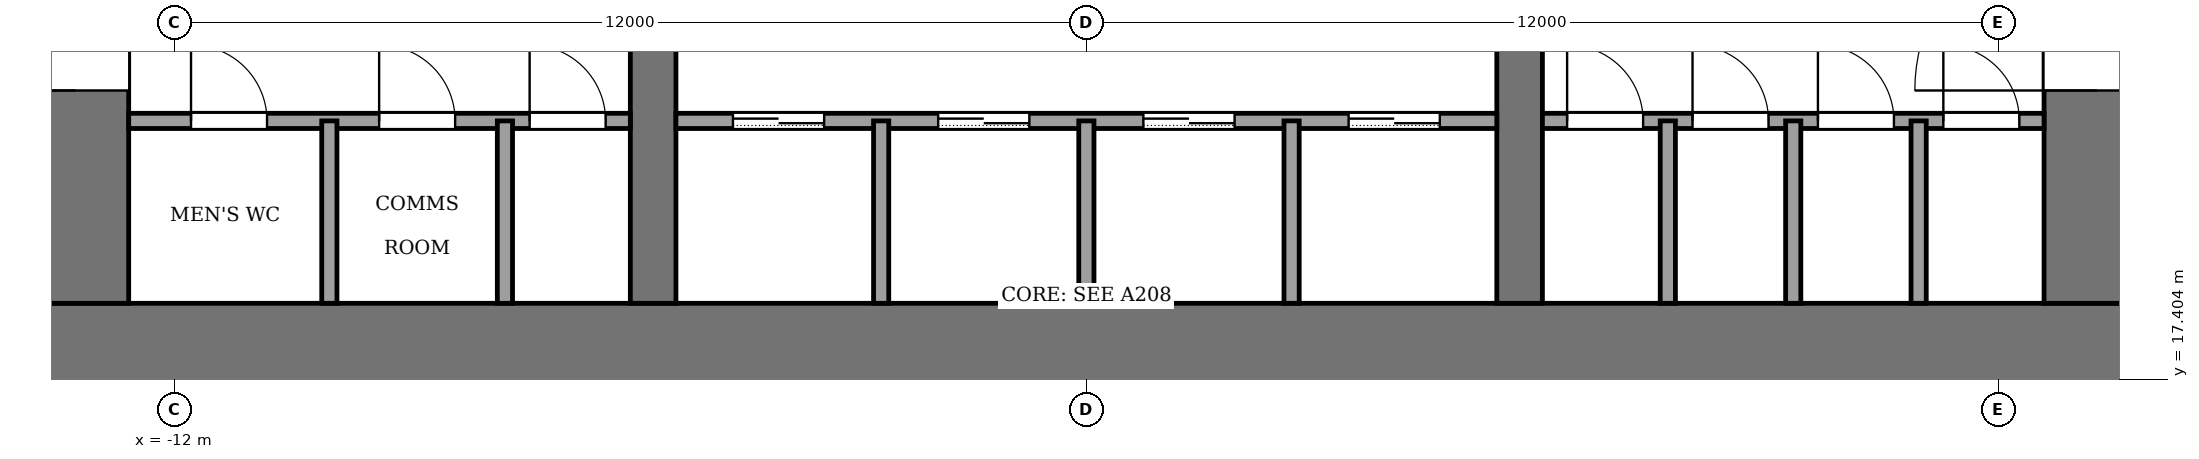
"""IFC4 building model, lengths in metres.
Left out: names, types, materials, properties, quantities, classifications, styles, units other than length and angle.
Written with IfcOpenShell. Run it as: python <this file> out.ifc"""

import sys

from ifc_helpers import new_model, si_unit, direction, frame, frame_2d, origin, place, context, subcontext, project, spatial, rectangle, extrude, element, fill, save


model = new_model("IFC4")
c1 = context("Model", 3, precision=1e-05, world=origin(), true_north=direction((0.0, 1.0)))
c2 = subcontext(c1, "Body", "Model", "MODEL_VIEW")
j1 = project(units=[si_unit("LENGTHUNIT", "METRE"), si_unit("PLANEANGLEUNIT", "RADIAN")], contexts=[c1])
p1 = place(None, origin())
s1 = spatial("IfcSite", under=j1, at=p1, CompositionType="ELEMENT")
p2 = place(p1, origin())
s2 = spatial("IfcBuilding", under=s1, at=p2, CompositionType="ELEMENT")
p3 = place(p2, frame((0.0, 0.0, 46.0)))
s3 = spatial("IfcBuildingStorey", under=s2, at=p3, CompositionType="ELEMENT", Elevation=46.0)
p4 = place(p3, frame((-14.0, 17.7, -0.13), z_axis=(0.0, 0.0, 1.0), x_axis=(1.0, 0.0, 0.0)))
e1 = element("IfcWall", 1, at=p4, inside=s3, PredefinedType="SHEAR", context=c2, shape_type="SweptSolid", body=[
    extrude(rectangle(XDim=28.0, YDim=1.4, at=frame_2d((14.0, 0.0))), origin(), (0.0, 0.0, 1.0), 4.0),
])
p5 = place(p3, frame((-13.3, 18.4, -0.13), z_axis=(0.0, 0.0, 1.0), x_axis=(0.0, 1.0, 0.0)))
e2 = element("IfcWall", 2, at=p5, inside=s3, PredefinedType="SHEAR", context=c2, shape_type="SweptSolid", body=[
    extrude(rectangle(XDim=19.2, YDim=1.4, at=frame_2d((9.6, 0.0))), origin(), (0.0, 0.0, 1.0), 4.0),
])
p6 = place(p5, frame((2.8, 0.0, 0.13)))
e3 = element("IfcOpeningElement", 3, at=p6, cuts=e2, PredefinedType="OPENING", context=c2, shape_type="SweptSolid", body=[
    extrude(rectangle(XDim=2.4, YDim=2.4, at=frame_2d((1.2, 1.2))), frame((0.0, 0.71, 0.0), z_axis=(0.0, -1.0, 0.0), x_axis=(1.0, 0.0, 0.0)), (0.0, 0.0, 1.0), 1.42),
])
p7 = place(p5, frame((13.4, 0.0, 0.13)))
e4 = element("IfcOpeningElement", 4, at=p7, cuts=e2, PredefinedType="OPENING", context=c2, shape_type="SweptSolid", body=[
    extrude(rectangle(XDim=1.4, YDim=2.2, at=frame_2d((0.7, 1.1))), frame((0.0, 0.71, 0.0), z_axis=(0.0, -1.0, 0.0), x_axis=(1.0, 0.0, 0.0)), (0.0, 0.0, 1.0), 1.42),
])
p8 = place(p3, frame((13.3, 18.4, -0.13), z_axis=(0.0, 0.0, 1.0), x_axis=(0.0, 1.0, 0.0)))
e5 = element("IfcWall", 5, at=p8, inside=s3, PredefinedType="SHEAR", context=c2, shape_type="SweptSolid", body=[
    extrude(rectangle(XDim=19.2, YDim=1.4, at=frame_2d((9.6, 0.0))), origin(), (0.0, 0.0, 1.0), 4.0),
])
p9 = place(p8, frame((2.8, 0.0, 0.13)))
e6 = element("IfcOpeningElement", 6, at=p9, cuts=e5, PredefinedType="OPENING", context=c2, shape_type="SweptSolid", body=[
    extrude(rectangle(XDim=2.4, YDim=2.4, at=frame_2d((1.2, 1.2))), frame((0.0, 0.71, 0.0), z_axis=(0.0, -1.0, 0.0), x_axis=(1.0, 0.0, 0.0)), (0.0, 0.0, 1.0), 1.42),
])
p10 = place(p8, frame((13.3, 0.0, 0.13)))
e7 = element("IfcOpeningElement", 7, at=p10, cuts=e5, PredefinedType="OPENING", context=c2, shape_type="SweptSolid", body=[
    extrude(rectangle(XDim=2.4, YDim=2.4, at=frame_2d((1.2, 1.2))), frame((0.0, 0.71, 0.0), z_axis=(0.0, -1.0, 0.0), x_axis=(1.0, 0.0, 0.0)), (0.0, 0.0, 1.0), 1.42),
])
p11 = place(p3, frame((-5.7, 18.4, -0.13), z_axis=(0.0, 0.0, 1.0), x_axis=(0.0, 1.0, 0.0)))
e8 = element("IfcWall", 8, at=p11, inside=s3, PredefinedType="SHEAR", context=c2, shape_type="SweptSolid", body=[
    extrude(rectangle(XDim=19.2, YDim=0.6, at=frame_2d((9.6, 0.0))), origin(), (0.0, 0.0, 1.0), 4.0),
])
p12 = place(p11, frame((8.35, 0.0, 0.13)))
e9 = element("IfcOpeningElement", 9, at=p12, cuts=e8, PredefinedType="OPENING", context=c2, shape_type="SweptSolid", body=[
    extrude(rectangle(XDim=0.9, YDim=2.1, at=frame_2d((0.45, 1.05))), frame((0.0, 0.31, 0.0), z_axis=(0.0, -1.0, 0.0), x_axis=(1.0, 0.0, 0.0)), (0.0, 0.0, 1.0), 0.62),
])
p13 = place(p3, frame((5.7, 18.4, -0.13), z_axis=(0.0, 0.0, 1.0), x_axis=(0.0, 1.0, 0.0)))
e10 = element("IfcWall", 10, at=p13, inside=s3, PredefinedType="SHEAR", context=c2, shape_type="SweptSolid", body=[
    extrude(rectangle(XDim=19.2, YDim=0.6, at=frame_2d((9.6, 0.0))), origin(), (0.0, 0.0, 1.0), 4.0),
])
p14 = place(p13, frame((13.3, 0.0, 0.13)))
e11 = element("IfcOpeningElement", 11, at=p14, cuts=e10, PredefinedType="OPENING", context=c2, shape_type="SweptSolid", body=[
    extrude(rectangle(XDim=2.4, YDim=2.4, at=frame_2d((1.2, 1.2))), frame((0.0, 0.31, 0.0), z_axis=(0.0, -1.0, 0.0), x_axis=(1.0, 0.0, 0.0)), (0.0, 0.0, 1.0), 0.62),
])
p15 = place(p3, frame((-12.6, 20.8, 0.0), z_axis=(0.0, 0.0, 1.0), x_axis=(1.0, 0.0, 0.0)))
e12 = element("IfcWall", 12, at=p15, inside=s3, PredefinedType="PARTITIONING", context=c2, shape_type="SweptSolid", body=[
    extrude(rectangle(XDim=6.6, YDim=0.2, at=frame_2d((3.3, 0.0))), origin(), (0.0, 0.0, 1.0), 3.87),
])
p16 = place(p15, frame((0.82, 0.0, 0.0)))
e13 = element("IfcOpeningElement", 13, at=p16, cuts=e12, PredefinedType="OPENING", context=c2, shape_type="SweptSolid", body=[
    extrude(rectangle(XDim=1.0, YDim=2.1, at=frame_2d((0.5, 1.05))), frame((0.0, 0.11, 0.0), z_axis=(0.0, -1.0, 0.0), x_axis=(1.0, 0.0, 0.0)), (0.0, 0.0, 1.0), 0.22),
])
p17 = place(p15, frame((3.295, 0.0, 0.0)))
e14 = element("IfcOpeningElement", 14, at=p17, cuts=e12, PredefinedType="OPENING", context=c2, shape_type="SweptSolid", body=[
    extrude(rectangle(XDim=1.0, YDim=2.1, at=frame_2d((0.5, 1.05))), frame((0.0, 0.11, 0.0), z_axis=(0.0, -1.0, 0.0), x_axis=(1.0, 0.0, 0.0)), (0.0, 0.0, 1.0), 0.22),
])
p18 = place(p15, frame((5.275, 0.0, 0.0)))
e15 = element("IfcOpeningElement", 15, at=p18, cuts=e12, PredefinedType="OPENING", context=c2, shape_type="SweptSolid", body=[
    extrude(rectangle(XDim=1.0, YDim=2.1, at=frame_2d((0.5, 1.05))), frame((0.0, 0.11, 0.0), z_axis=(0.0, -1.0, 0.0), x_axis=(1.0, 0.0, 0.0)), (0.0, 0.0, 1.0), 0.22),
])
p19 = place(p3, frame((-5.4, 20.8, 0.0), z_axis=(0.0, 0.0, 1.0), x_axis=(1.0, 0.0, 0.0)))
e16 = element("IfcWall", 16, at=p19, inside=s3, PredefinedType="PARTITIONING", context=c2, shape_type="SweptSolid", body=[
    extrude(rectangle(XDim=10.8, YDim=0.2, at=frame_2d((5.4, 0.0))), origin(), (0.0, 0.0, 1.0), 3.87),
])
p20 = place(p19, frame((0.75, 0.0, 0.0)))
e17 = element("IfcOpeningElement", 17, at=p20, cuts=e16, PredefinedType="OPENING", context=c2, shape_type="SweptSolid", body=[
    extrude(rectangle(XDim=1.2, YDim=2.2, at=frame_2d((0.6, 1.1))), frame((0.0, 0.11, 0.0), z_axis=(0.0, -1.0, 0.0), x_axis=(1.0, 0.0, 0.0)), (0.0, 0.0, 1.0), 0.22),
])
p21 = place(p19, frame((3.45, 0.0, 0.0)))
e18 = element("IfcOpeningElement", 18, at=p21, cuts=e16, PredefinedType="OPENING", context=c2, shape_type="SweptSolid", body=[
    extrude(rectangle(XDim=1.2, YDim=2.2, at=frame_2d((0.6, 1.1))), frame((0.0, 0.11, 0.0), z_axis=(0.0, -1.0, 0.0), x_axis=(1.0, 0.0, 0.0)), (0.0, 0.0, 1.0), 0.22),
])
p22 = place(p19, frame((6.15, 0.0, 0.0)))
e19 = element("IfcOpeningElement", 19, at=p22, cuts=e16, PredefinedType="OPENING", context=c2, shape_type="SweptSolid", body=[
    extrude(rectangle(XDim=1.2, YDim=2.2, at=frame_2d((0.6, 1.1))), frame((0.0, 0.11, 0.0), z_axis=(0.0, -1.0, 0.0), x_axis=(1.0, 0.0, 0.0)), (0.0, 0.0, 1.0), 0.22),
])
p23 = place(p19, frame((8.85, 0.0, 0.0)))
e20 = element("IfcOpeningElement", 20, at=p23, cuts=e16, PredefinedType="OPENING", context=c2, shape_type="SweptSolid", body=[
    extrude(rectangle(XDim=1.2, YDim=2.2, at=frame_2d((0.6, 1.1))), frame((0.0, 0.11, 0.0), z_axis=(0.0, -1.0, 0.0), x_axis=(1.0, 0.0, 0.0)), (0.0, 0.0, 1.0), 0.22),
])
p24 = place(p3, frame((6.0, 20.8, 0.0), z_axis=(0.0, 0.0, 1.0), x_axis=(1.0, 0.0, 0.0)))
e21 = element("IfcWall", 21, at=p24, inside=s3, PredefinedType="PARTITIONING", context=c2, shape_type="SweptSolid", body=[
    extrude(rectangle(XDim=6.6, YDim=0.2, at=frame_2d((3.3, 0.0))), origin(), (0.0, 0.0, 1.0), 3.87),
])
p25 = place(p24, frame((0.325, 0.0, 0.0)))
e22 = element("IfcOpeningElement", 22, at=p25, cuts=e21, PredefinedType="OPENING", context=c2, shape_type="SweptSolid", body=[
    extrude(rectangle(XDim=1.0, YDim=2.1, at=frame_2d((0.5, 1.05))), frame((0.0, 0.11, 0.0), z_axis=(0.0, -1.0, 0.0), x_axis=(1.0, 0.0, 0.0)), (0.0, 0.0, 1.0), 0.22),
])
p26 = place(p24, frame((1.975, 0.0, 0.0)))
e23 = element("IfcOpeningElement", 23, at=p26, cuts=e21, PredefinedType="OPENING", context=c2, shape_type="SweptSolid", body=[
    extrude(rectangle(XDim=1.0, YDim=2.1, at=frame_2d((0.5, 1.05))), frame((0.0, 0.11, 0.0), z_axis=(0.0, -1.0, 0.0), x_axis=(1.0, 0.0, 0.0)), (0.0, 0.0, 1.0), 0.22),
])
p27 = place(p24, frame((3.625, 0.0, 0.0)))
e24 = element("IfcOpeningElement", 24, at=p27, cuts=e21, PredefinedType="OPENING", context=c2, shape_type="SweptSolid", body=[
    extrude(rectangle(XDim=1.0, YDim=2.1, at=frame_2d((0.5, 1.05))), frame((0.0, 0.11, 0.0), z_axis=(0.0, -1.0, 0.0), x_axis=(1.0, 0.0, 0.0)), (0.0, 0.0, 1.0), 0.22),
])
p28 = place(p24, frame((5.275, 0.0, 0.0)))
e25 = element("IfcOpeningElement", 25, at=p28, cuts=e21, PredefinedType="OPENING", context=c2, shape_type="SweptSolid", body=[
    extrude(rectangle(XDim=1.0, YDim=2.1, at=frame_2d((0.5, 1.05))), frame((0.0, 0.11, 0.0), z_axis=(0.0, -1.0, 0.0), x_axis=(1.0, 0.0, 0.0)), (0.0, 0.0, 1.0), 0.22),
])
for number, where, z_axis, x_axis in (
    (26, (-9.96, 18.4, 0.0), (0.0, 0.0, 1.0), (0.0, 1.0, 0.0)),
    (27, (-7.65, 18.4, 0.0), (0.0, 0.0, 1.0), (0.0, 1.0, 0.0)),
    (28, (-2.7, 18.4, 0.0), (0.0, 0.0, 1.0), (0.0, 1.0, 0.0)),
    (29, (0.0, 18.4, 0.0), (0.0, 0.0, 1.0), (0.0, 1.0, 0.0)),
    (30, (2.7, 18.4, 0.0), (0.0, 0.0, 1.0), (0.0, 1.0, 0.0)),
    (31, (7.65, 18.4, 0.0), (0.0, 0.0, 1.0), (0.0, 1.0, 0.0)),
    (32, (9.3, 18.4, 0.0), (0.0, 0.0, 1.0), (0.0, 1.0, 0.0)),
    (33, (10.95, 18.4, 0.0), (0.0, 0.0, 1.0), (0.0, 1.0, 0.0)),
):
    element("IfcWall", number, at=place(p3, frame(where, z_axis=z_axis, x_axis=x_axis)), inside=s3, PredefinedType="PARTITIONING", context=c2, shape_type="SweptSolid", body=[
        extrude(rectangle(XDim=2.4, YDim=0.2, at=frame_2d((1.2, 0.0))), origin(), (0.0, 0.0, 1.0), 3.87),
    ])
p29 = place(p20, origin())
e34 = element("IfcDoor", 34, at=p29, inside=s3, OperationType="SLIDING_TO_LEFT", PredefinedType="DOOR", context=c2, shape_type="SweptSolid", body=[
    extrude(rectangle(XDim=1.2, YDim=2.2, at=frame_2d((0.6, 1.1))), frame((0.0, 0.025, 0.0), z_axis=(0.0, -1.0, 0.0), x_axis=(1.0, 0.0, 0.0)), (0.0, 0.0, 1.0), 0.05),
])
fill(e17, e34)
p30 = place(p21, origin())
e35 = element("IfcDoor", 35, at=p30, inside=s3, OperationType="SLIDING_TO_LEFT", PredefinedType="DOOR", context=c2, shape_type="SweptSolid", body=[
    extrude(rectangle(XDim=1.2, YDim=2.2, at=frame_2d((0.6, 1.1))), frame((0.0, 0.025, 0.0), z_axis=(0.0, -1.0, 0.0), x_axis=(1.0, 0.0, 0.0)), (0.0, 0.0, 1.0), 0.05),
])
fill(e18, e35)
p31 = place(p22, origin())
e36 = element("IfcDoor", 36, at=p31, inside=s3, OperationType="SLIDING_TO_LEFT", PredefinedType="DOOR", context=c2, shape_type="SweptSolid", body=[
    extrude(rectangle(XDim=1.2, YDim=2.2, at=frame_2d((0.6, 1.1))), frame((0.0, 0.025, 0.0), z_axis=(0.0, -1.0, 0.0), x_axis=(1.0, 0.0, 0.0)), (0.0, 0.0, 1.0), 0.05),
])
fill(e19, e36)
p32 = place(p23, origin())
e37 = element("IfcDoor", 37, at=p32, inside=s3, OperationType="SLIDING_TO_LEFT", PredefinedType="DOOR", context=c2, shape_type="SweptSolid", body=[
    extrude(rectangle(XDim=1.2, YDim=2.2, at=frame_2d((0.6, 1.1))), frame((0.0, 0.025, 0.0), z_axis=(0.0, -1.0, 0.0), x_axis=(1.0, 0.0, 0.0)), (0.0, 0.0, 1.0), 0.05),
])
fill(e20, e37)
p33 = place(p16, origin())
e38 = element("IfcDoor", 38, at=p33, inside=s3, OperationType="SINGLE_SWING_LEFT", PredefinedType="DOOR", context=c2, shape_type="SweptSolid", body=[
    extrude(rectangle(XDim=1.0, YDim=2.1, at=frame_2d((0.5, 1.05))), frame((0.0, 0.025, 0.0), z_axis=(0.0, -1.0, 0.0), x_axis=(1.0, 0.0, 0.0)), (0.0, 0.0, 1.0), 0.05),
])
fill(e13, e38)
p34 = place(p17, origin())
e39 = element("IfcDoor", 39, at=p34, inside=s3, OperationType="SINGLE_SWING_LEFT", PredefinedType="DOOR", context=c2, shape_type="SweptSolid", body=[
    extrude(rectangle(XDim=1.0, YDim=2.1, at=frame_2d((0.5, 1.05))), frame((0.0, 0.025, 0.0), z_axis=(0.0, -1.0, 0.0), x_axis=(1.0, 0.0, 0.0)), (0.0, 0.0, 1.0), 0.05),
])
fill(e14, e39)
p35 = place(p18, origin())
e40 = element("IfcDoor", 40, at=p35, inside=s3, OperationType="SINGLE_SWING_RIGHT", PredefinedType="DOOR", context=c2, shape_type="SweptSolid", body=[
    extrude(rectangle(XDim=1.0, YDim=2.1, at=frame_2d((0.5, 1.05))), frame((0.0, 0.025, 0.0), z_axis=(0.0, -1.0, 0.0), x_axis=(1.0, 0.0, 0.0)), (0.0, 0.0, 1.0), 0.05),
])
fill(e15, e40)
p36 = place(p25, origin())
e41 = element("IfcDoor", 41, at=p36, inside=s3, OperationType="SINGLE_SWING_LEFT", PredefinedType="DOOR", context=c2, shape_type="SweptSolid", body=[
    extrude(rectangle(XDim=1.0, YDim=2.1, at=frame_2d((0.5, 1.05))), frame((0.0, 0.025, 0.0), z_axis=(0.0, -1.0, 0.0), x_axis=(1.0, 0.0, 0.0)), (0.0, 0.0, 1.0), 0.05),
])
fill(e22, e41)
p37 = place(p26, origin())
e42 = element("IfcDoor", 42, at=p37, inside=s3, OperationType="SINGLE_SWING_LEFT", PredefinedType="DOOR", context=c2, shape_type="SweptSolid", body=[
    extrude(rectangle(XDim=1.0, YDim=2.1, at=frame_2d((0.5, 1.05))), frame((0.0, 0.025, 0.0), z_axis=(0.0, -1.0, 0.0), x_axis=(1.0, 0.0, 0.0)), (0.0, 0.0, 1.0), 0.05),
])
fill(e23, e42)
p38 = place(p27, origin())
e43 = element("IfcDoor", 43, at=p38, inside=s3, OperationType="SINGLE_SWING_RIGHT", PredefinedType="DOOR", context=c2, shape_type="SweptSolid", body=[
    extrude(rectangle(XDim=1.0, YDim=2.1, at=frame_2d((0.5, 1.05))), frame((0.0, 0.025, 0.0), z_axis=(0.0, -1.0, 0.0), x_axis=(1.0, 0.0, 0.0)), (0.0, 0.0, 1.0), 0.05),
])
fill(e24, e43)
p39 = place(p28, origin())
e44 = element("IfcDoor", 44, at=p39, inside=s3, OperationType="SINGLE_SWING_RIGHT", PredefinedType="DOOR", context=c2, shape_type="SweptSolid", body=[
    extrude(rectangle(XDim=1.0, YDim=2.1, at=frame_2d((0.5, 1.05))), frame((0.0, 0.025, 0.0), z_axis=(0.0, -1.0, 0.0), x_axis=(1.0, 0.0, 0.0)), (0.0, 0.0, 1.0), 0.05),
])
fill(e25, e44)
p40 = place(p6, origin())
e45 = element("IfcDoor", 45, at=p40, inside=s3, OperationType="DOUBLE_DOOR_SINGLE_SWING", PredefinedType="DOOR", context=c2, shape_type="SweptSolid", body=[
    extrude(rectangle(XDim=2.4, YDim=2.4, at=frame_2d((1.2, 1.2))), frame((0.0, 0.025, 0.0), z_axis=(0.0, -1.0, 0.0), x_axis=(1.0, 0.0, 0.0)), (0.0, 0.0, 1.0), 0.05),
])
fill(e3, e45)
p41 = place(p9, origin())
e46 = element("IfcDoor", 46, at=p41, inside=s3, OperationType="DOUBLE_DOOR_SINGLE_SWING", PredefinedType="DOOR", context=c2, shape_type="SweptSolid", body=[
    extrude(rectangle(XDim=2.4, YDim=2.4, at=frame_2d((1.2, 1.2))), frame((0.0, 0.025, 0.0), z_axis=(0.0, -1.0, 0.0), x_axis=(1.0, 0.0, 0.0)), (0.0, 0.0, 1.0), 0.05),
])
fill(e6, e46)
save(model, sys.argv[1])
